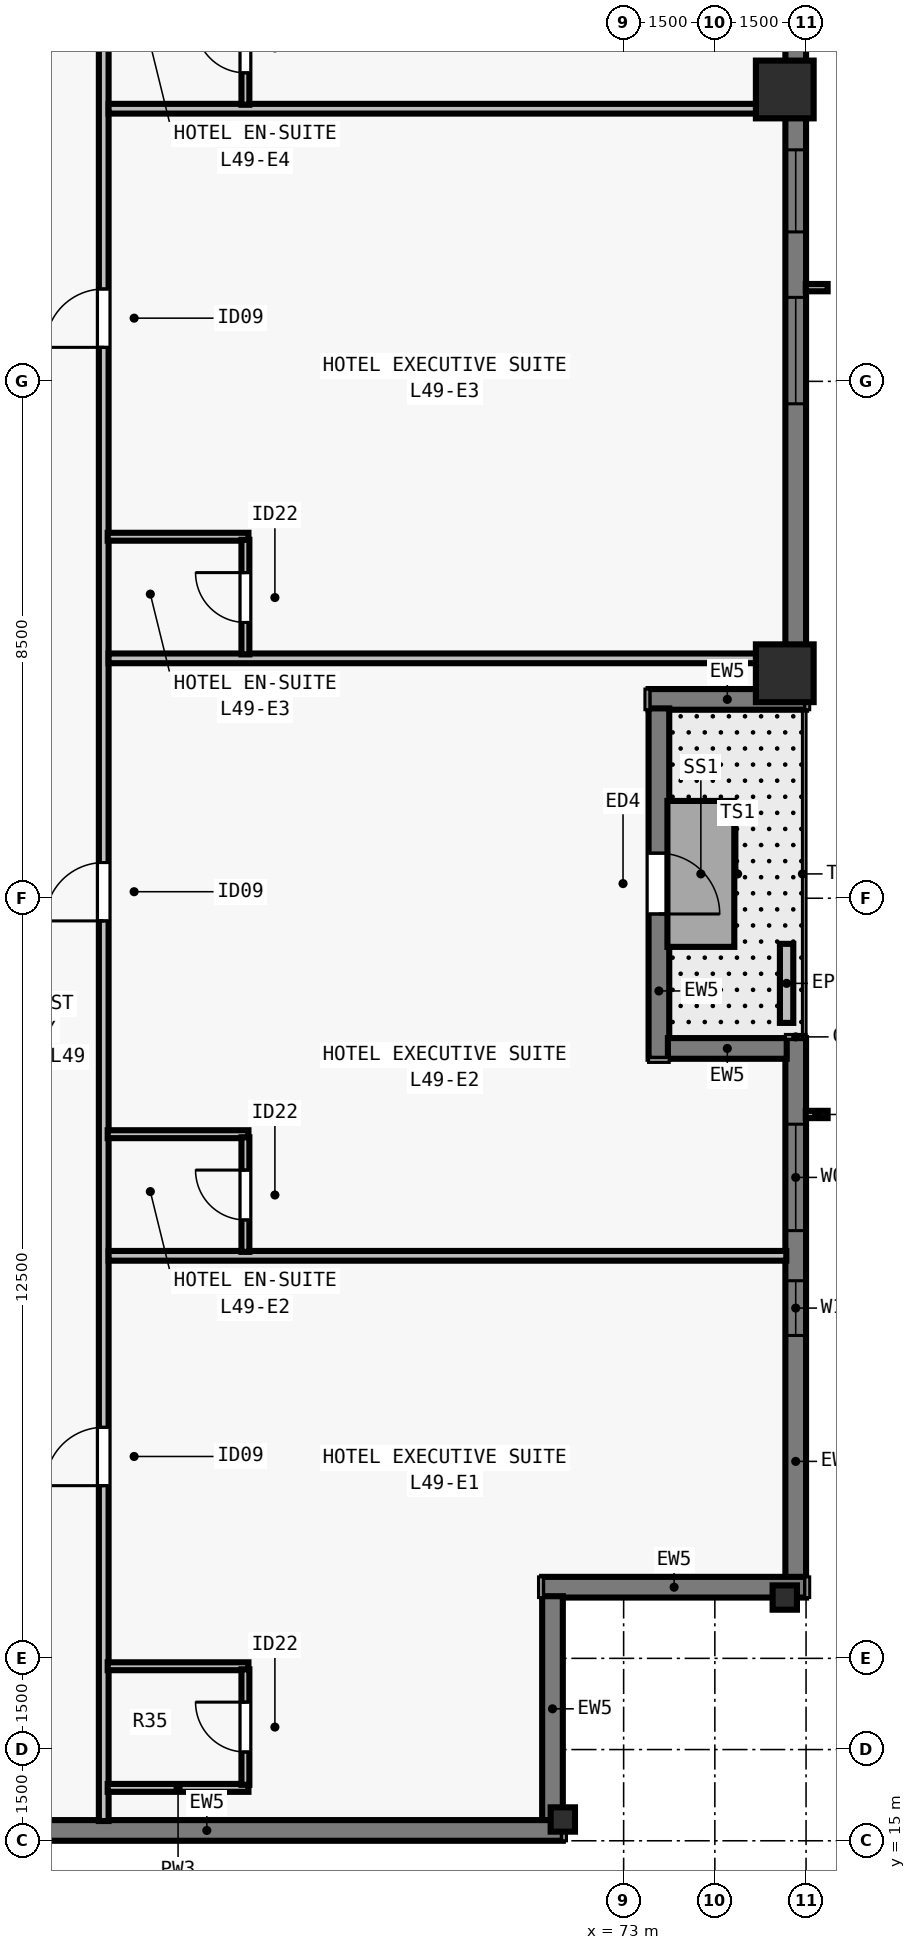
"""IFC4 building model, lengths in metres.
Left out: names, types, materials, properties, quantities, classifications, styles, units other than length and angle.
Written with IfcOpenShell. Run it as: python <this file> out.ifc"""

import sys

from ifc_helpers import new_model, si_unit, direction, frame, frame_2d, origin, origin_2d, place, context, subcontext, project, spatial, rectangle, i_section, extrude, element, fill, save


model = new_model("IFC4")
c1 = context("Model", 3, precision=1e-05, world=origin(), true_north=direction((0.0, 1.0)))
c2 = subcontext(c1, "Body", "Model", "MODEL_VIEW")
j1 = project(units=[si_unit("LENGTHUNIT", "METRE"), si_unit("PLANEANGLEUNIT", "RADIAN")], contexts=[c1])
p1 = place(None, origin())
s1 = spatial("IfcSite", under=j1, at=p1, CompositionType="ELEMENT")
p2 = place(p1, origin())
s2 = spatial("IfcBuilding", under=s1, at=p2, CompositionType="ELEMENT")
p3 = place(p2, frame((0.0, 0.0, 179.5)))
s3 = spatial("IfcBuildingStorey", under=s2, at=p3, CompositionType="ELEMENT", Elevation=179.5)
for number, where, z_axis, x_axis in (
    (1, (72.0, 15.35, 0.0), (0.0, 0.0, 1.0), (1.0, 0.0, 0.0)),
    (2, (75.65, 19.0, 0.0), (0.0, 0.0, 1.0), (0.0, 1.0, 0.0)),
):
    element("IfcColumn", number, at=place(p3, frame(where, z_axis=z_axis, x_axis=x_axis)), inside=s3, PredefinedType="COLUMN", context=c2, shape_type="SweptSolid", body=[
        extrude(i_section(OverallWidth=0.4, OverallDepth=0.4, WebThickness=0.022, FlangeThickness=0.036, at=origin_2d()), origin(), (0.0, 0.0, 1.0), 3.5),
    ])
for number, where, z_axis, x_axis in (
    (3, (75.65, 34.2, 0.0), (0.0, 0.0, 1.0), (0.0, 1.0, 0.0)),
    (4, (75.65, 43.8, 0.0), (0.0, 0.0, 1.0), (0.0, 1.0, 0.0)),
):
    element("IfcColumn", number, at=place(p3, frame(where, z_axis=z_axis, x_axis=x_axis)), inside=s3, PredefinedType="COLUMN", context=c2, shape_type="SweptSolid", body=[
        extrude(rectangle(XDim=0.95, YDim=0.95, at=origin_2d()), origin(), (0.0, 0.0, 1.0), 3.5),
    ])
p4 = place(p3, frame((75.83, 28.2, 0.0), z_axis=(0.0, 0.0, 1.0), x_axis=(0.0, -1.0, 0.0)))
e5 = element("IfcWall", 5, at=p4, inside=s3, PredefinedType="SOLIDWALL", context=c2, shape_type="SweptSolid", body=[
    extrude(rectangle(XDim=8.882, YDim=0.34, at=frame_2d((4.441, 0.0))), origin(), (0.0, 0.0, 1.0), 3.28),
])
p5 = place(p4, frame((1.416, 0.0, 0.8)))
e6 = element("IfcOpeningElement", 6, at=p5, cuts=e5, PredefinedType="OPENING", context=c2, shape_type="SweptSolid", body=[
    extrude(rectangle(XDim=1.75, YDim=1.66, at=frame_2d((0.875, 0.83))), frame((0.0, 0.18, 0.0), z_axis=(0.0, -1.0, 0.0), x_axis=(1.0, 0.0, 0.0)), (0.0, 0.0, 1.0), 0.36),
])
p6 = place(p4, frame((3.99, 0.0, 0.8)))
e7 = element("IfcOpeningElement", 7, at=p6, cuts=e5, PredefinedType="OPENING", context=c2, shape_type="SweptSolid", body=[
    extrude(rectangle(XDim=0.9, YDim=1.66, at=frame_2d((0.45, 0.83))), frame((0.0, 0.18, 0.0), z_axis=(0.0, -1.0, 0.0), x_axis=(1.0, 0.0, 0.0)), (0.0, 0.0, 1.0), 0.36),
])
p7 = place(p3, frame((76.0, 19.17, 0.0), z_axis=(0.0, 0.0, 1.0), x_axis=(-1.0, 0.0, 0.0)))
e8 = element("IfcWall", 8, at=p7, inside=s3, PredefinedType="SOLIDWALL", context=c2, shape_type="SweptSolid", body=[
    extrude(rectangle(XDim=4.34, YDim=0.34, at=frame_2d((2.17, 0.0))), origin(), (0.0, 0.0, 1.0), 3.28),
])
p8 = place(p3, frame((71.83, 19.022, 0.0), z_axis=(0.0, 0.0, 1.0), x_axis=(0.0, -1.0, 0.0)))
e9 = element("IfcWall", 9, at=p8, inside=s3, PredefinedType="SOLIDWALL", context=c2, shape_type="SweptSolid", body=[
    extrude(rectangle(XDim=3.704, YDim=0.34, at=frame_2d((1.852, 0.0))), origin(), (0.0, 0.0, 1.0), 3.28),
])
p9 = place(p3, frame((72.0, 15.17, 0.0), z_axis=(0.0, 0.0, 1.0), x_axis=(-1.0, 0.0, 0.0)))
e10 = element("IfcWall", 10, at=p9, inside=s3, PredefinedType="SOLIDWALL", context=c2, shape_type="SweptSolid", body=[
    extrude(rectangle(XDim=39.682, YDim=0.34, at=frame_2d((19.841, 0.0))), origin(), (0.0, 0.0, 1.0), 3.28),
])
p10 = place(p9, frame((11.859, 0.0, 0.8)))
e11 = element("IfcOpeningElement", 11, at=p10, cuts=e10, PredefinedType="OPENING", context=c2, shape_type="SweptSolid", body=[
    extrude(rectangle(XDim=1.75, YDim=1.66, at=frame_2d((0.875, 0.83))), frame((0.0, 0.18, 0.0), z_axis=(0.0, -1.0, 0.0), x_axis=(1.0, 0.0, 0.0)), (0.0, 0.0, 1.0), 0.36),
])
p11 = place(p9, frame((18.966, 0.0, 0.8)))
e12 = element("IfcOpeningElement", 12, at=p11, cuts=e10, PredefinedType="OPENING", context=c2, shape_type="SweptSolid", body=[
    extrude(rectangle(XDim=1.75, YDim=1.66, at=frame_2d((0.875, 0.83))), frame((0.0, 0.18, 0.0), z_axis=(0.0, -1.0, 0.0), x_axis=(1.0, 0.0, 0.0)), (0.0, 0.0, 1.0), 0.36),
])
p12 = place(p9, frame((22.27, 0.0, 0.8)))
e13 = element("IfcOpeningElement", 13, at=p12, cuts=e10, PredefinedType="OPENING", context=c2, shape_type="SweptSolid", body=[
    extrude(rectangle(XDim=1.35, YDim=1.66, at=frame_2d((0.675, 0.83))), frame((0.0, 0.18, 0.0), z_axis=(0.0, -1.0, 0.0), x_axis=(1.0, 0.0, 0.0)), (0.0, 0.0, 1.0), 0.36),
])
p13 = place(p9, frame((26.073, 0.0, 0.8)))
e14 = element("IfcOpeningElement", 14, at=p13, cuts=e10, PredefinedType="OPENING", context=c2, shape_type="SweptSolid", body=[
    extrude(rectangle(XDim=1.75, YDim=1.66, at=frame_2d((0.875, 0.83))), frame((0.0, 0.18, 0.0), z_axis=(0.0, -1.0, 0.0), x_axis=(1.0, 0.0, 0.0)), (0.0, 0.0, 1.0), 0.36),
])
p14 = place(p9, frame((29.827, 0.0, 0.8)))
e15 = element("IfcOpeningElement", 15, at=p14, cuts=e10, PredefinedType="OPENING", context=c2, shape_type="SweptSolid", body=[
    extrude(rectangle(XDim=1.35, YDim=1.66, at=frame_2d((0.675, 0.83))), frame((0.0, 0.18, 0.0), z_axis=(0.0, -1.0, 0.0), x_axis=(1.0, 0.0, 0.0)), (0.0, 0.0, 1.0), 0.36),
])
p15 = place(p3, frame((75.83, 59.0, 0.0), z_axis=(0.0, 0.0, 1.0), x_axis=(0.0, -1.0, 0.0)))
e16 = element("IfcWall", 16, at=p15, inside=s3, PredefinedType="SOLIDWALL", context=c2, shape_type="SweptSolid", body=[
    extrude(rectangle(XDim=25.082, YDim=0.34, at=frame_2d((12.541, 0.0))), origin(), (0.0, 0.0, 1.0), 3.28),
])
p16 = place(p15, frame((8.39, 0.0, 0.8)))
e17 = element("IfcOpeningElement", 17, at=p16, cuts=e16, PredefinedType="OPENING", context=c2, shape_type="SweptSolid", body=[
    extrude(rectangle(XDim=1.35, YDim=1.66, at=frame_2d((0.675, 0.83))), frame((0.0, 0.18, 0.0), z_axis=(0.0, -1.0, 0.0), x_axis=(1.0, 0.0, 0.0)), (0.0, 0.0, 1.0), 0.36),
])
p17 = place(p15, frame((11.666, 0.0, 0.8)))
e18 = element("IfcOpeningElement", 18, at=p17, cuts=e16, PredefinedType="OPENING", context=c2, shape_type="SweptSolid", body=[
    extrude(rectangle(XDim=1.75, YDim=1.66, at=frame_2d((0.875, 0.83))), frame((0.0, 0.18, 0.0), z_axis=(0.0, -1.0, 0.0), x_axis=(1.0, 0.0, 0.0)), (0.0, 0.0, 1.0), 0.36),
])
p18 = place(p15, frame((16.192, 0.0, 0.8)))
e19 = element("IfcOpeningElement", 19, at=p18, cuts=e16, PredefinedType="OPENING", context=c2, shape_type="SweptSolid", body=[
    extrude(rectangle(XDim=1.35, YDim=1.66, at=frame_2d((0.675, 0.83))), frame((0.0, 0.18, 0.0), z_axis=(0.0, -1.0, 0.0), x_axis=(1.0, 0.0, 0.0)), (0.0, 0.0, 1.0), 0.36),
])
p19 = place(p15, frame((18.619, 0.0, 0.8)))
e20 = element("IfcOpeningElement", 20, at=p19, cuts=e16, PredefinedType="OPENING", context=c2, shape_type="SweptSolid", body=[
    extrude(rectangle(XDim=1.75, YDim=1.66, at=frame_2d((0.875, 0.83))), frame((0.0, 0.18, 0.0), z_axis=(0.0, -1.0, 0.0), x_axis=(1.0, 0.0, 0.0)), (0.0, 0.0, 1.0), 0.36),
])
p20 = place(p3, frame((76.0, 33.77, 0.0), z_axis=(0.0, 0.0, 1.0), x_axis=(-1.0, 0.0, 0.0)))
e21 = element("IfcWall", 21, at=p20, inside=s3, PredefinedType="SOLIDWALL", context=c2, shape_type="SweptSolid", body=[
    extrude(rectangle(XDim=2.59, YDim=0.34, at=frame_2d((1.295, 0.0))), origin(), (0.0, 0.0, 1.0), 3.28),
])
p21 = place(p3, frame((73.58, 33.622, 0.0), z_axis=(0.0, 0.0, 1.0), x_axis=(0.0, -1.0, 0.0)))
e22 = element("IfcWall", 22, at=p21, inside=s3, PredefinedType="SOLIDWALL", context=c2, shape_type="SweptSolid", body=[
    extrude(rectangle(XDim=5.762, YDim=0.34, at=frame_2d((2.881, 0.0))), origin(), (0.0, 0.0, 1.0), 3.28),
])
p22 = place(p21, frame((2.381, 0.0, 0.0)))
e23 = element("IfcOpeningElement", 23, at=p22, cuts=e22, PredefinedType="OPENING", context=c2, shape_type="SweptSolid", body=[
    extrude(rectangle(XDim=1.0, YDim=2.15, at=frame_2d((0.5, 1.075))), frame((0.0, 0.18, 0.0), z_axis=(0.0, -1.0, 0.0), x_axis=(1.0, 0.0, 0.0)), (0.0, 0.0, 1.0), 0.36),
])
p23 = place(p3, frame((73.728, 28.03, 0.0), z_axis=(0.0, 0.0, 1.0), x_axis=(1.0, 0.0, 0.0)))
e24 = element("IfcWall", 24, at=p23, inside=s3, PredefinedType="SOLIDWALL", context=c2, shape_type="SweptSolid", body=[
    extrude(rectangle(XDim=1.954, YDim=0.34, at=frame_2d((0.977, 0.0))), origin(), (0.0, 0.0, 1.0), 3.28),
])
p24 = place(p3, frame((75.68, 28.45, 0.0), z_axis=(0.0, 0.0, 1.0), x_axis=(0.0, 1.0, 0.0)))
e25 = element("IfcWall", 25, at=p24, inside=s3, PredefinedType="PARAPET", context=c2, shape_type="SweptSolid", body=[
    extrude(rectangle(XDim=1.3, YDim=0.22, at=frame_2d((0.65, 0.0))), origin(), (0.0, 0.0, 1.0), 0.55),
])
p25 = place(p3, frame((64.45, 15.325, 0.0), z_axis=(0.0, 0.0, 1.0), x_axis=(0.0, 1.0, 0.0)))
e26 = element("IfcWall", 26, at=p25, inside=s3, PredefinedType="PARTITIONING", context=c2, shape_type="SweptSolid", body=[
    extrude(rectangle(XDim=47.35, YDim=0.16, at=frame_2d((23.675, 0.0))), origin(), (0.0, 0.0, 1.0), 2.555),
])
p26 = place(p25, frame((5.515, 0.0, 0.0)))
e27 = element("IfcOpeningElement", 27, at=p26, cuts=e26, PredefinedType="OPENING", context=c2, shape_type="SweptSolid", body=[
    extrude(rectangle(XDim=0.96, YDim=2.15, at=frame_2d((0.48, 1.075))), frame((0.0, 0.09, 0.0), z_axis=(0.0, -1.0, 0.0), x_axis=(1.0, 0.0, 0.0)), (0.0, 0.0, 1.0), 0.18),
])
p27 = place(p25, frame((14.802, 0.0, 0.0)))
e28 = element("IfcOpeningElement", 28, at=p27, cuts=e26, PredefinedType="OPENING", context=c2, shape_type="SweptSolid", body=[
    extrude(rectangle(XDim=0.96, YDim=2.15, at=frame_2d((0.48, 1.075))), frame((0.0, 0.09, 0.0), z_axis=(0.0, -1.0, 0.0), x_axis=(1.0, 0.0, 0.0)), (0.0, 0.0, 1.0), 0.18),
])
p28 = place(p25, frame((24.234, 0.0, 0.0)))
e29 = element("IfcOpeningElement", 29, at=p28, cuts=e26, PredefinedType="OPENING", context=c2, shape_type="SweptSolid", body=[
    extrude(rectangle(XDim=0.96, YDim=2.15, at=frame_2d((0.48, 1.075))), frame((0.0, 0.09, 0.0), z_axis=(0.0, -1.0, 0.0), x_axis=(1.0, 0.0, 0.0)), (0.0, 0.0, 1.0), 0.18),
])
p29 = place(p25, frame((33.666, 0.0, 0.0)))
e30 = element("IfcOpeningElement", 30, at=p29, cuts=e26, PredefinedType="OPENING", context=c2, shape_type="SweptSolid", body=[
    extrude(rectangle(XDim=0.96, YDim=2.15, at=frame_2d((0.48, 1.075))), frame((0.0, 0.09, 0.0), z_axis=(0.0, -1.0, 0.0), x_axis=(1.0, 0.0, 0.0)), (0.0, 0.0, 1.0), 0.18),
])
p30 = place(p25, frame((43.214, 0.0, 0.0)))
e31 = element("IfcOpeningElement", 31, at=p30, cuts=e26, PredefinedType="OPENING", context=c2, shape_type="SweptSolid", body=[
    extrude(rectangle(XDim=0.96, YDim=2.15, at=frame_2d((0.48, 1.075))), frame((0.0, 0.09, 0.0), z_axis=(0.0, -1.0, 0.0), x_axis=(1.0, 0.0, 0.0)), (0.0, 0.0, 1.0), 0.18),
])
for number, where, z_axis, x_axis in (
    (32, (64.515, 15.87, 0.0), (0.0, 0.0, 1.0), (1.0, 0.0, 0.0)),
    (33, (64.515, 17.87, 0.0), (0.0, 0.0, 1.0), (1.0, 0.0, 0.0)),
):
    element("IfcWall", number, at=place(p3, frame(where, z_axis=z_axis, x_axis=x_axis)), inside=s3, PredefinedType="PLUMBINGWALL", context=c2, shape_type="SweptSolid", body=[
        extrude(rectangle(XDim=2.315, YDim=0.13, at=frame_2d((1.158, 0.0))), origin(), (0.0, 0.0, 1.0), 3.28),
    ])
p31 = place(p3, frame((66.78, 15.92, 0.0), z_axis=(0.0, 0.0, 1.0), x_axis=(0.0, 1.0, 0.0)))
e34 = element("IfcWall", 34, at=p31, inside=s3, PredefinedType="PLUMBINGWALL", context=c2, shape_type="SweptSolid", body=[
    extrude(rectangle(XDim=1.9, YDim=0.13, at=frame_2d((0.95, 0.0))), origin(), (0.0, 0.0, 1.0), 3.28),
])
p32 = place(p31, frame((0.54, 0.0, 0.0)))
e35 = element("IfcOpeningElement", 35, at=p32, cuts=e34, PredefinedType="OPENING", context=c2, shape_type="SweptSolid", body=[
    extrude(rectangle(XDim=0.82, YDim=2.1, at=frame_2d((0.41, 1.05))), frame((0.0, 0.075, 0.0), z_axis=(0.0, -1.0, 0.0), x_axis=(1.0, 0.0, 0.0)), (0.0, 0.0, 1.0), 0.15),
])
p33 = place(p3, frame((64.53, 24.62, 0.0), z_axis=(0.0, 0.0, 1.0), x_axis=(1.0, 0.0, 0.0)))
e36 = element("IfcWall", 36, at=p33, inside=s3, PredefinedType="PARTITIONING", context=c2, shape_type="SweptSolid", body=[
    extrude(rectangle(XDim=11.145, YDim=0.16, at=frame_2d((5.573, 0.0))), origin(), (0.0, 0.0, 1.0), 2.896),
])
p34 = place(p3, frame((64.515, 26.62, 0.0), z_axis=(0.0, 0.0, 1.0), x_axis=(1.0, 0.0, 0.0)))
e37 = element("IfcWall", 37, at=p34, inside=s3, PredefinedType="PLUMBINGWALL", context=c2, shape_type="SweptSolid", body=[
    extrude(rectangle(XDim=2.315, YDim=0.13, at=frame_2d((1.158, 0.0))), origin(), (0.0, 0.0, 1.0), 2.896),
])
p35 = place(p3, frame((66.78, 24.685, 0.0), z_axis=(0.0, 0.0, 1.0), x_axis=(0.0, 1.0, 0.0)))
e38 = element("IfcWall", 38, at=p35, inside=s3, PredefinedType="PLUMBINGWALL", context=c2, shape_type="SweptSolid", body=[
    extrude(rectangle(XDim=1.885, YDim=0.13, at=frame_2d((0.942, 0.0))), origin(), (0.0, 0.0, 1.0), 3.28),
])
p36 = place(p35, frame((0.525, 0.0, 0.0)))
e39 = element("IfcOpeningElement", 39, at=p36, cuts=e38, PredefinedType="OPENING", context=c2, shape_type="SweptSolid", body=[
    extrude(rectangle(XDim=0.82, YDim=2.1, at=frame_2d((0.41, 1.05))), frame((0.0, 0.075, 0.0), z_axis=(0.0, -1.0, 0.0), x_axis=(1.0, 0.0, 0.0)), (0.0, 0.0, 1.0), 0.15),
])
p37 = place(p3, frame((64.53, 34.445, 0.0), z_axis=(0.0, 0.0, 1.0), x_axis=(1.0, 0.0, 0.0)))
e40 = element("IfcWall", 40, at=p37, inside=s3, PredefinedType="PARTITIONING", context=c2, shape_type="SweptSolid", body=[
    extrude(rectangle(XDim=11.145, YDim=0.16, at=frame_2d((5.573, 0.0))), origin(), (0.0, 0.0, 1.0), 3.28),
])
p38 = place(p3, frame((64.515, 36.445, 0.0), z_axis=(0.0, 0.0, 1.0), x_axis=(1.0, 0.0, 0.0)))
e41 = element("IfcWall", 41, at=p38, inside=s3, PredefinedType="PLUMBINGWALL", context=c2, shape_type="SweptSolid", body=[
    extrude(rectangle(XDim=2.315, YDim=0.13, at=frame_2d((1.158, 0.0))), origin(), (0.0, 0.0, 1.0), 3.28),
])
p39 = place(p3, frame((66.78, 34.51, 0.0), z_axis=(0.0, 0.0, 1.0), x_axis=(0.0, 1.0, 0.0)))
e42 = element("IfcWall", 42, at=p39, inside=s3, PredefinedType="PLUMBINGWALL", context=c2, shape_type="SweptSolid", body=[
    extrude(rectangle(XDim=1.885, YDim=0.13, at=frame_2d((0.942, 0.0))), origin(), (0.0, 0.0, 1.0), 3.28),
])
p40 = place(p39, frame((0.525, 0.0, 0.0)))
e43 = element("IfcOpeningElement", 43, at=p40, cuts=e42, PredefinedType="OPENING", context=c2, shape_type="SweptSolid", body=[
    extrude(rectangle(XDim=0.82, YDim=2.1, at=frame_2d((0.41, 1.05))), frame((0.0, 0.075, 0.0), z_axis=(0.0, -1.0, 0.0), x_axis=(1.0, 0.0, 0.0)), (0.0, 0.0, 1.0), 0.15),
])
p41 = place(p3, frame((64.53, 43.484, 0.0), z_axis=(0.0, 0.0, 1.0), x_axis=(1.0, 0.0, 0.0)))
e44 = element("IfcWall", 44, at=p41, inside=s3, PredefinedType="PARTITIONING", context=c2, shape_type="SweptSolid", body=[
    extrude(rectangle(XDim=11.145, YDim=0.16, at=frame_2d((5.573, 0.0))), origin(), (0.0, 0.0, 1.0), 3.28),
])
p42 = place(p3, frame((66.78, 43.549, 0.0), z_axis=(0.0, 0.0, 1.0), x_axis=(0.0, 1.0, 0.0)))
e45 = element("IfcWall", 45, at=p42, inside=s3, PredefinedType="PLUMBINGWALL", context=c2, shape_type="SweptSolid", body=[
    extrude(rectangle(XDim=1.885, YDim=0.13, at=frame_2d((0.942, 0.0))), origin(), (0.0, 0.0, 1.0), 3.28),
])
p43 = place(p42, frame((0.525, 0.0, 0.0)))
e46 = element("IfcOpeningElement", 46, at=p43, cuts=e45, PredefinedType="OPENING", context=c2, shape_type="SweptSolid", body=[
    extrude(rectangle(XDim=0.82, YDim=2.1, at=frame_2d((0.41, 1.05))), frame((0.0, 0.075, 0.0), z_axis=(0.0, -1.0, 0.0), x_axis=(1.0, 0.0, 0.0)), (0.0, 0.0, 1.0), 0.15),
])
p44 = place(p5, origin())
e47 = element("IfcWindow", 47, at=p44, inside=s3, PartitioningType="SINGLE_PANEL", PredefinedType="WINDOW", context=c2, shape_type="SweptSolid", body=[
    extrude(rectangle(XDim=1.75, YDim=1.66, at=frame_2d((0.875, 0.83))), frame((0.0, -0.05, 0.0), z_axis=(0.0, -1.0, 0.0), x_axis=(1.0, 0.0, 0.0)), (0.0, 0.0, 1.0), 0.06),
])
fill(e6, e47)
p45 = place(p18, origin())
e48 = element("IfcWindow", 48, at=p45, inside=s3, PartitioningType="SINGLE_PANEL", PredefinedType="WINDOW", context=c2, shape_type="SweptSolid", body=[
    extrude(rectangle(XDim=1.35, YDim=1.66, at=frame_2d((0.675, 0.83))), frame((0.0, -0.05, 0.0), z_axis=(0.0, -1.0, 0.0), x_axis=(1.0, 0.0, 0.0)), (0.0, 0.0, 1.0), 0.06),
])
fill(e19, e48)
p46 = place(p19, origin())
e49 = element("IfcWindow", 49, at=p46, inside=s3, PartitioningType="SINGLE_PANEL", PredefinedType="WINDOW", context=c2, shape_type="SweptSolid", body=[
    extrude(rectangle(XDim=1.75, YDim=1.66, at=frame_2d((0.875, 0.83))), frame((0.0, -0.05, 0.0), z_axis=(0.0, -1.0, 0.0), x_axis=(1.0, 0.0, 0.0)), (0.0, 0.0, 1.0), 0.06),
])
fill(e20, e49)
p47 = place(p22, origin())
e50 = element("IfcDoor", 50, at=p47, inside=s3, OperationType="SINGLE_SWING_RIGHT", PredefinedType="DOOR", context=c2, shape_type="SweptSolid", body=[
    extrude(rectangle(XDim=1.0, YDim=2.15, at=frame_2d((0.5, 1.075))), frame((0.0, 0.025, 0.0), z_axis=(0.0, -1.0, 0.0), x_axis=(1.0, 0.0, 0.0)), (0.0, 0.0, 1.0), 0.05),
])
fill(e23, e50)
p48 = place(p6, origin())
e51 = element("IfcWindow", 51, at=p48, inside=s3, PartitioningType="SINGLE_PANEL", PredefinedType="WINDOW", context=c2, shape_type="SweptSolid", body=[
    extrude(rectangle(XDim=0.9, YDim=1.66, at=frame_2d((0.45, 0.83))), frame((0.0, -0.04, 0.0), z_axis=(0.0, -1.0, 0.0), x_axis=(1.0, 0.0, 0.0)), (0.0, 0.0, 1.0), 0.06),
])
fill(e7, e51)
p49 = place(p32, origin())
e52 = element("IfcDoor", 52, at=p49, inside=s3, OperationType="SINGLE_SWING_RIGHT", PredefinedType="DOOR", context=c2, shape_type="SweptSolid", body=[
    extrude(rectangle(XDim=0.82, YDim=2.1, at=frame_2d((0.41, 1.05))), frame((0.0, 0.025, 0.0), z_axis=(0.0, -1.0, 0.0), x_axis=(1.0, 0.0, 0.0)), (0.0, 0.0, 1.0), 0.05),
])
fill(e35, e52)
p50 = place(p26, origin())
e53 = element("IfcDoor", 53, at=p50, inside=s3, OperationType="SINGLE_SWING_LEFT", PredefinedType="DOOR", context=c2, shape_type="SweptSolid", body=[
    extrude(rectangle(XDim=0.96, YDim=2.15, at=frame_2d((0.48, 1.075))), frame((0.0, 0.025, 0.0), z_axis=(0.0, -1.0, 0.0), x_axis=(1.0, 0.0, 0.0)), (0.0, 0.0, 1.0), 0.05),
])
fill(e27, e53)
p51 = place(p36, origin())
e54 = element("IfcDoor", 54, at=p51, inside=s3, OperationType="SINGLE_SWING_RIGHT", PredefinedType="DOOR", context=c2, shape_type="SweptSolid", body=[
    extrude(rectangle(XDim=0.82, YDim=2.1, at=frame_2d((0.41, 1.05))), frame((0.0, 0.025, 0.0), z_axis=(0.0, -1.0, 0.0), x_axis=(1.0, 0.0, 0.0)), (0.0, 0.0, 1.0), 0.05),
])
fill(e39, e54)
p52 = place(p27, origin())
e55 = element("IfcDoor", 55, at=p52, inside=s3, OperationType="SINGLE_SWING_LEFT", PredefinedType="DOOR", context=c2, shape_type="SweptSolid", body=[
    extrude(rectangle(XDim=0.96, YDim=2.15, at=frame_2d((0.48, 1.075))), frame((0.0, 0.025, 0.0), z_axis=(0.0, -1.0, 0.0), x_axis=(1.0, 0.0, 0.0)), (0.0, 0.0, 1.0), 0.05),
])
fill(e28, e55)
p53 = place(p40, origin())
e56 = element("IfcDoor", 56, at=p53, inside=s3, OperationType="SINGLE_SWING_RIGHT", PredefinedType="DOOR", context=c2, shape_type="SweptSolid", body=[
    extrude(rectangle(XDim=0.82, YDim=2.1, at=frame_2d((0.41, 1.05))), frame((0.0, 0.025, 0.0), z_axis=(0.0, -1.0, 0.0), x_axis=(1.0, 0.0, 0.0)), (0.0, 0.0, 1.0), 0.05),
])
fill(e43, e56)
p54 = place(p28, origin())
e57 = element("IfcDoor", 57, at=p54, inside=s3, OperationType="SINGLE_SWING_LEFT", PredefinedType="DOOR", context=c2, shape_type="SweptSolid", body=[
    extrude(rectangle(XDim=0.96, YDim=2.15, at=frame_2d((0.48, 1.075))), frame((0.0, 0.025, 0.0), z_axis=(0.0, -1.0, 0.0), x_axis=(1.0, 0.0, 0.0)), (0.0, 0.0, 1.0), 0.05),
])
fill(e29, e57)
p55 = place(p43, origin())
e58 = element("IfcDoor", 58, at=p55, inside=s3, OperationType="SINGLE_SWING_RIGHT", PredefinedType="DOOR", context=c2, shape_type="SweptSolid", body=[
    extrude(rectangle(XDim=0.82, YDim=2.1, at=frame_2d((0.41, 1.05))), frame((0.0, 0.025, 0.0), z_axis=(0.0, -1.0, 0.0), x_axis=(1.0, 0.0, 0.0)), (0.0, 0.0, 1.0), 0.05),
])
fill(e46, e58)
save(model, sys.argv[1])
